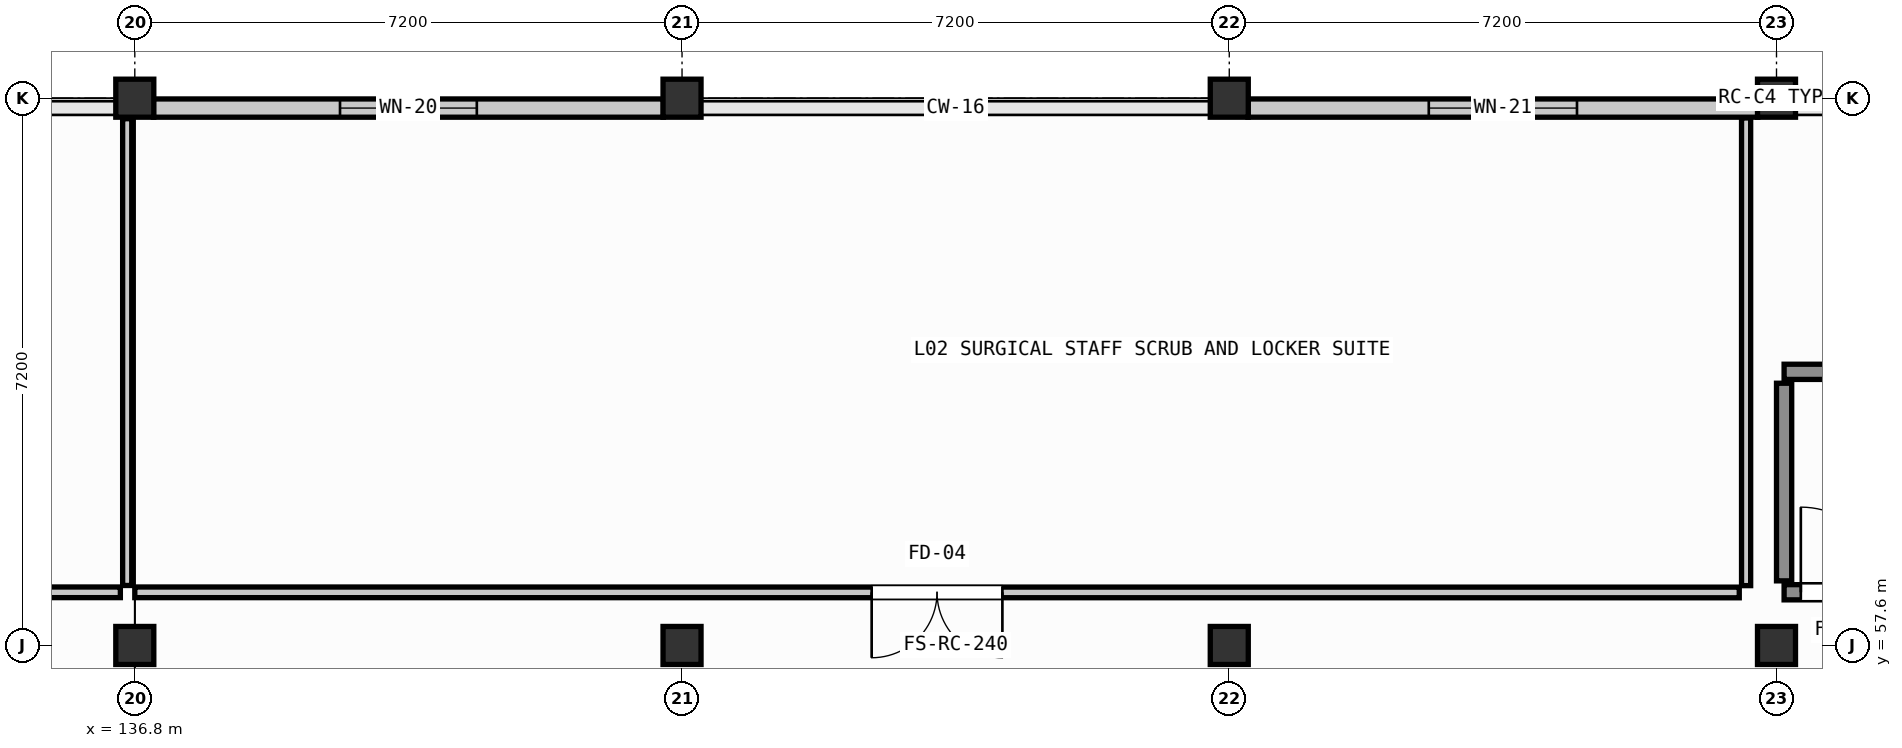
"""IFC4 building model, lengths in metres.
Left out: names, types, materials, properties, quantities, classifications, styles, units other than length and angle.
Written with IfcOpenShell. Run it as: python <this file> out.ifc"""

import sys

from ifc_helpers import new_model, si_unit, direction, frame, frame_2d, origin, origin_2d, place, context, subcontext, project, spatial, rectangle, extrude, element, fill, save


model = new_model("IFC4")
c1 = context("Model", 3, precision=1e-05, world=origin(), true_north=direction((0.0, 1.0)))
c2 = subcontext(c1, "Body", "Model", "MODEL_VIEW")
j1 = project(units=[si_unit("LENGTHUNIT", "METRE"), si_unit("PLANEANGLEUNIT", "RADIAN")], contexts=[c1])
p1 = place(None, origin())
s1 = spatial("IfcSite", under=j1, at=p1, CompositionType="ELEMENT")
p2 = place(p1, origin())
s2 = spatial("IfcBuilding", under=s1, at=p2, CompositionType="ELEMENT")
p3 = place(p2, frame((0.0, 0.0, 4.8)))
s3 = spatial("IfcBuildingStorey", under=s2, at=p3, CompositionType="ELEMENT", Elevation=4.8)
for number, where, z_axis, x_axis in (
    (1, (136.8, 57.6, 0.0), (0.0, 0.0, 1.0), (1.0, 0.0, 0.0)),
    (2, (136.8, 64.8, 0.0), (0.0, 0.0, 1.0), (1.0, 0.0, 0.0)),
    (3, (144.0, 57.6, 0.0), (0.0, 0.0, 1.0), (1.0, 0.0, 0.0)),
    (4, (144.0, 64.8, 0.0), (0.0, 0.0, 1.0), (1.0, 0.0, 0.0)),
    (5, (151.2, 57.6, 0.0), (0.0, 0.0, 1.0), (1.0, 0.0, 0.0)),
    (6, (151.2, 64.8, 0.0), (0.0, 0.0, 1.0), (1.0, 0.0, 0.0)),
    (7, (158.4, 57.6, 0.0), (0.0, 0.0, 1.0), (1.0, 0.0, 0.0)),
    (8, (158.4, 64.8, 0.0), (0.0, 0.0, 1.0), (1.0, 0.0, 0.0)),
):
    element("IfcColumn", number, at=place(p3, frame(where, z_axis=z_axis, x_axis=x_axis)), inside=s3, PredefinedType="COLUMN", context=c2, shape_type="SweptSolid", body=[
        extrude(rectangle(XDim=0.5, YDim=0.5, at=origin_2d()), origin(), (0.0, 0.0, 1.0), 4.2),
    ])
p4 = place(p3, frame((137.045, 64.67, 0.0), z_axis=(0.0, 0.0, 1.0), x_axis=(1.0, 0.0, 0.0)))
e9 = element("IfcWall", 9, at=p4, inside=s3, PredefinedType="SOLIDWALL", context=c2, shape_type="SweptSolid", body=[
    extrude(rectangle(XDim=6.71, YDim=0.24, at=frame_2d((3.355, 0.0))), origin(), (0.0, 0.0, 1.0), 3.4),
])
p5 = place(p4, frame((2.455, 0.0, 1.5)))
e10 = element("IfcOpeningElement", 10, at=p5, cuts=e9, PredefinedType="OPENING", context=c2, shape_type="SweptSolid", body=[
    extrude(rectangle(XDim=1.8, YDim=0.95, at=frame_2d((0.9, 0.475))), frame((0.0, 0.13, 0.0), z_axis=(0.0, -1.0, 0.0), x_axis=(1.0, 0.0, 0.0)), (0.0, 0.0, 1.0), 0.26),
])
p6 = place(p3, frame((151.445, 64.67, 0.0), z_axis=(0.0, 0.0, 1.0), x_axis=(1.0, 0.0, 0.0)))
e11 = element("IfcWall", 11, at=p6, inside=s3, PredefinedType="SOLIDWALL", context=c2, shape_type="SweptSolid", body=[
    extrude(rectangle(XDim=6.71, YDim=0.24, at=frame_2d((3.355, 0.0))), origin(), (0.0, 0.0, 1.0), 3.4),
])
p7 = place(p6, frame((2.38, 0.0, 1.5)))
e12 = element("IfcOpeningElement", 12, at=p7, cuts=e11, PredefinedType="OPENING", context=c2, shape_type="SweptSolid", body=[
    extrude(rectangle(XDim=1.95, YDim=0.95, at=frame_2d((0.975, 0.475))), frame((0.0, 0.13, 0.0), z_axis=(0.0, -1.0, 0.0), x_axis=(1.0, 0.0, 0.0)), (0.0, 0.0, 1.0), 0.26),
])
p8 = place(p3, frame((158.5, 58.3, 0.0), z_axis=(0.0, 0.0, 1.0), x_axis=(1.0, 0.0, 0.0)))
e13 = element("IfcWall", 13, at=p8, inside=s3, PredefinedType="SHEAR", context=c2, shape_type="SweptSolid", body=[
    extrude(rectangle(XDim=6.775, YDim=0.2, at=frame_2d((3.387, 0.0))), origin(), (0.0, 0.0, 1.0), 4.5),
])
p9 = place(p8, frame((0.22, 0.0, 0.0)))
e14 = element("IfcOpeningElement", 14, at=p9, cuts=e13, PredefinedType="OPENING", context=c2, shape_type="SweptSolid", body=[
    extrude(rectangle(XDim=1.12, YDim=2.14, at=frame_2d((0.56, 1.07))), frame((0.0, 0.11, 0.0), z_axis=(0.0, -1.0, 0.0), x_axis=(1.0, 0.0, 0.0)), (0.0, 0.0, 1.0), 0.22),
])
p10 = place(p3, frame((158.5, 61.2, 0.0), z_axis=(0.0, 0.0, 1.0), x_axis=(1.0, 0.0, 0.0)))
e15 = element("IfcWall", 15, at=p10, inside=s3, PredefinedType="SHEAR", context=c2, shape_type="SweptSolid", body=[
    extrude(rectangle(XDim=6.775, YDim=0.2, at=frame_2d((3.387, 0.0))), origin(), (0.0, 0.0, 1.0), 4.5),
])
p11 = place(p3, frame((158.5, 58.45, 0.0), z_axis=(0.0, 0.0, 1.0), x_axis=(0.0, 1.0, 0.0)))
e16 = element("IfcWall", 16, at=p11, inside=s3, PredefinedType="SHEAR", context=c2, shape_type="SweptSolid", body=[
    extrude(rectangle(XDim=2.6, YDim=0.2, at=frame_2d((1.3, 0.0))), origin(), (0.0, 0.0, 1.0), 4.5),
])
p12 = place(p3, frame((136.7, 64.53, 0.0), z_axis=(0.0, 0.0, 1.0), x_axis=(0.0, -1.0, 0.0)))
e17 = element("IfcWall", 17, at=p12, inside=s3, PredefinedType="PARTITIONING", context=c2, shape_type="SweptSolid", body=[
    extrude(rectangle(XDim=6.141, YDim=0.12, at=frame_2d((3.07, 0.0))), origin(), (0.0, 0.0, 1.0), 3.4),
])
p13 = place(p3, frame((136.61, 58.299, 0.0), z_axis=(0.0, 0.0, 1.0), x_axis=(-0.999999995374, 9.6186637e-05, 0.0)))
e18 = element("IfcWall", 18, at=p13, inside=s3, PredefinedType="PARTITIONING", context=c2, shape_type="SweptSolid", body=[
    extrude(rectangle(XDim=27.92, YDim=0.14, at=frame_2d((13.96, 0.0))), origin(), (0.0, 0.0, 1.0), 3.5),
])
p14 = place(p13, frame((11.5, 0.0, 0.0)))
e19 = element("IfcOpeningElement", 19, at=p14, cuts=e18, PredefinedType="OPENING", context=c2, shape_type="SweptSolid", body=[
    extrude(rectangle(XDim=1.32, YDim=2.2, at=frame_2d((0.66, 1.1))), frame((0.0, 0.08, 0.0), z_axis=(0.0, -1.0, 0.0), x_axis=(1.0, 0.0, 0.0)), (0.0, 0.0, 1.0), 0.16),
])
p15 = place(p3, frame((158.0, 64.54, 0.0), z_axis=(0.0, 0.0, 1.0), x_axis=(0.0, -1.0, 0.0)))
e20 = element("IfcWall", 20, at=p15, inside=s3, PredefinedType="PARTITIONING", context=c2, shape_type="SweptSolid", body=[
    extrude(rectangle(XDim=6.153, YDim=0.12, at=frame_2d((3.076, 0.0))), origin(), (0.0, 0.0, 1.0), 3.4),
])
p16 = place(p3, frame((157.91, 58.297, 0.0), z_axis=(0.0, 0.0, 1.0), x_axis=(-0.999999994583, 0.000104087155, 0.0)))
e21 = element("IfcWall", 21, at=p16, inside=s3, PredefinedType="PARTITIONING", context=c2, shape_type="SweptSolid", body=[
    extrude(rectangle(XDim=21.11, YDim=0.14, at=frame_2d((10.555, 0.0))), origin(), (0.0, 0.0, 1.0), 3.5),
])
p17 = place(p16, frame((9.695, 0.0, 0.0)))
e22 = element("IfcOpeningElement", 22, at=p17, cuts=e21, PredefinedType="OPENING", context=c2, shape_type="SweptSolid", body=[
    extrude(rectangle(XDim=1.72, YDim=2.26, at=frame_2d((0.86, 1.13))), frame((0.0, 0.08, 0.0), z_axis=(0.0, -1.0, 0.0), x_axis=(1.0, 0.0, 0.0)), (0.0, 0.0, 1.0), 0.16),
])
p18 = place(p5, origin())
e23 = element("IfcWindow", 23, at=p18, inside=s3, PartitioningType="SINGLE_PANEL", PredefinedType="WINDOW", context=c2, shape_type="SweptSolid", body=[
    extrude(rectangle(XDim=1.8, YDim=0.95, at=frame_2d((0.9, 0.475))), frame((0.0, 0.03, 0.0), z_axis=(0.0, -1.0, 0.0), x_axis=(1.0, 0.0, 0.0)), (0.0, 0.0, 1.0), 0.06),
])
fill(e10, e23)
p19 = place(p7, origin())
e24 = element("IfcWindow", 24, at=p19, inside=s3, PartitioningType="SINGLE_PANEL", PredefinedType="WINDOW", context=c2, shape_type="SweptSolid", body=[
    extrude(rectangle(XDim=1.95, YDim=0.95, at=frame_2d((0.975, 0.475))), frame((0.0, 0.03, 0.0), z_axis=(0.0, -1.0, 0.0), x_axis=(1.0, 0.0, 0.0)), (0.0, 0.0, 1.0), 0.06),
])
fill(e12, e24)
p20 = place(p9, origin())
e25 = element("IfcDoor", 25, at=p20, inside=s3, OperationType="SINGLE_SWING_LEFT", PredefinedType="DOOR", context=c2, shape_type="SweptSolid", body=[
    extrude(rectangle(XDim=1.12, YDim=2.14, at=frame_2d((0.56, 1.07))), frame((0.0, 0.025, 0.0), z_axis=(0.0, -1.0, 0.0), x_axis=(1.0, 0.0, 0.0)), (0.0, 0.0, 1.0), 0.05),
])
fill(e14, e25)
p21 = place(p17, origin())
e26 = element("IfcDoor", 26, at=p21, inside=s3, OperationType="DOUBLE_DOOR_SINGLE_SWING", PredefinedType="DOOR", context=c2, shape_type="SweptSolid", body=[
    extrude(rectangle(XDim=1.72, YDim=2.26, at=frame_2d((0.86, 1.13))), frame((0.0, 0.025, 0.0), z_axis=(0.0, -1.0, 0.0), x_axis=(1.0, 0.0, 0.0)), (0.0, 0.0, 1.0), 0.05),
])
fill(e22, e26)
save(model, sys.argv[1])
